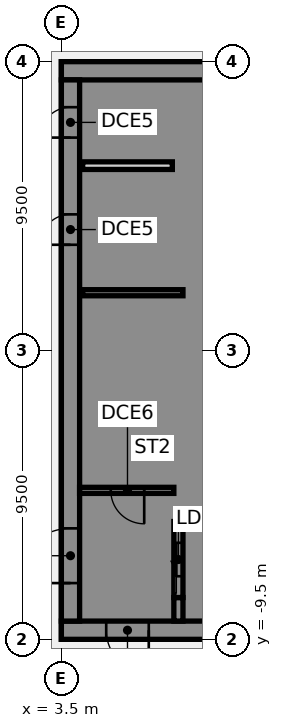
"""IFC4 building model, lengths in metres.
Left out: names, types, materials, properties, quantities, classifications, styles, units other than length and angle.
Written with IfcOpenShell. Run it as: python <this file> out.ifc"""

import sys

from ifc_helpers import new_model, si_unit, direction, frame, frame_2d, origin, place, context, subcontext, project, spatial, polyline, rectangle, outline, extrude, element, fill, save


model = new_model("IFC4")
c1 = context("Model", 3, precision=1e-05, world=origin(), true_north=direction((0.0, 1.0)))
c2 = subcontext(c1, "Body", "Model", "MODEL_VIEW")
j1 = project(units=[si_unit("LENGTHUNIT", "METRE"), si_unit("PLANEANGLEUNIT", "RADIAN")], contexts=[c1])
p1 = place(None, origin())
s1 = spatial("IfcSite", under=j1, at=p1, CompositionType="ELEMENT")
p2 = place(p1, origin())
s2 = spatial("IfcBuilding", under=s1, at=p2, CompositionType="ELEMENT")
p3 = place(p2, frame((0.0, 0.0, 91.0)))
s3 = spatial("IfcBuildingStorey", under=s2, at=p3, CompositionType="ELEMENT", Elevation=91.0)
p4 = place(p3, frame((16.5, -9.2, 0.0), z_axis=(0.0, 0.0, 1.0), x_axis=(-1.0, 0.0, 0.0)))
e1 = element("IfcWall", 1, at=p4, inside=s3, PredefinedType="SHEAR", context=c2, shape_type="SweptSolid", body=[
    extrude(rectangle(XDim=13.0, YDim=0.6, at=frame_2d((6.5, 0.0))), origin(), (0.0, 0.0, 1.0), 3.61),
])
p5 = place(p4, frame((4.15, 0.0, 0.0)))
e2 = element("IfcOpeningElement", 2, at=p5, cuts=e1, PredefinedType="OPENING", context=c2, shape_type="SweptSolid", body=[
    extrude(rectangle(XDim=1.4, YDim=2.1, at=frame_2d((0.7, 1.05))), frame((0.0, 0.31, 0.0), z_axis=(0.0, -1.0, 0.0), x_axis=(1.0, 0.0, 0.0)), (0.0, 0.0, 1.0), 0.62),
])
p6 = place(p4, frame((10.125, 0.0, 0.0)))
e3 = element("IfcOpeningElement", 3, at=p6, cuts=e1, PredefinedType="OPENING", context=c2, shape_type="SweptSolid", body=[
    extrude(rectangle(XDim=1.4, YDim=2.1, at=frame_2d((0.7, 1.05))), frame((0.0, 0.31, 0.0), z_axis=(0.0, -1.0, 0.0), x_axis=(1.0, 0.0, 0.0)), (0.0, 0.0, 1.0), 0.62),
])
p7 = place(p3, frame((16.5, 9.2, 0.0), z_axis=(0.0, 0.0, 1.0), x_axis=(-1.0, 0.0, 0.0)))
e4 = element("IfcWall", 4, at=p7, inside=s3, PredefinedType="SHEAR", context=c2, shape_type="SweptSolid", body=[
    extrude(rectangle(XDim=13.0, YDim=0.6, at=frame_2d((6.5, 0.0))), origin(), (0.0, 0.0, 1.0), 3.61),
])
p8 = place(p3, origin())
e5 = element("IfcWall", 5, at=p8, inside=s3, PredefinedType="SHEAR", context=c2, shape_type="SweptSolid", body=[
    extrude(outline(polyline([(9.8, -5.375), (7.5, -5.375), (7.5, -2.875), (9.8, -2.875), (9.8, -2.625), (7.5, -2.625), (7.5, -0.125), (9.8, -0.125), (9.8, 0.125), (7.5, 0.125), (7.5, 2.625), (9.8, 2.625), (9.8, 2.875), (7.5, 2.875), (7.5, 5.375), (9.8, 5.375), (9.8, 5.625), (7.5, 5.625), (7.5, 8.125), (9.8, 8.125), (9.8, 8.9), (7.5, 8.9), (7.2, 8.9), (7.2, -5.625), (7.5, -5.625), (9.8, -5.625), (9.8, -5.375)])), origin(), (0.0, 0.0, 1.0), 3.61),
])
p9 = place(p3, origin())
e6 = element("IfcWall", 6, at=p9, inside=s3, PredefinedType="SHEAR", context=c2, shape_type="SweptSolid", body=[
    extrude(outline(polyline([(7.5, -8.125), (7.5, -8.9), (9.8, -8.9), (9.8, -8.125), (9.8, -5.625), (9.55, -5.625), (9.55, -8.125), (7.5, -8.125)])), origin(), (0.0, 0.0, 1.0), 3.61),
])
p10 = place(p3, frame((7.35, -8.9, 0.0), z_axis=(0.0, 0.0, 1.0), x_axis=(0.0, 1.0, 0.0)))
e7 = element("IfcWall", 7, at=p10, inside=s3, PredefinedType="SHEAR", context=c2, shape_type="SweptSolid", body=[
    extrude(rectangle(XDim=0.775, YDim=0.3, at=frame_2d((0.387, 0.0))), origin(), (0.0, 0.0, 1.0), 3.61),
])
p11 = place(p3, frame((7.5, 1.9, 0.0), z_axis=(0.0, 0.0, 1.0), x_axis=(-1.0, 0.0, 0.0)))
e8 = element("IfcWall", 8, at=p11, inside=s3, PredefinedType="SHEAR", context=c2, shape_type="SweptSolid", body=[
    extrude(rectangle(XDim=3.3, YDim=0.2, at=frame_2d((1.65, 0.0))), origin(), (0.0, 0.0, 1.0), 3.61),
])
p12 = place(p3, frame((7.35, -8.125, 0.0), z_axis=(0.0, 0.0, 1.0), x_axis=(0.0, 1.0, 0.0)))
e9 = element("IfcWall", 9, at=p12, inside=s3, PredefinedType="SHEAR", context=c2, shape_type="SweptSolid", body=[
    extrude(rectangle(XDim=2.5, YDim=0.3, at=frame_2d((1.25, 0.0))), origin(), (0.0, 0.0, 1.0), 3.61),
])
p13 = place(p12, frame((0.7, 0.0, 0.0)))
e10 = element("IfcOpeningElement", 10, at=p13, cuts=e9, PredefinedType="OPENING", context=c2, shape_type="SweptSolid", body=[
    extrude(rectangle(XDim=1.1, YDim=2.1, at=frame_2d((0.55, 1.05))), frame((0.0, 0.16, 0.0), z_axis=(0.0, -1.0, 0.0), x_axis=(1.0, 0.0, 0.0)), (0.0, 0.0, 1.0), 0.32),
])
p14 = place(p3, frame((3.8, -8.9, 0.0), z_axis=(0.0, 0.0, 1.0), x_axis=(0.0, 1.0, 0.0)))
e11 = element("IfcWall", 11, at=p14, inside=s3, PredefinedType="SHEAR", context=c2, shape_type="SweptSolid", body=[
    extrude(rectangle(XDim=17.8, YDim=0.6, at=frame_2d((8.9, 0.0))), origin(), (0.0, 0.0, 1.0), 3.61),
])
p15 = place(p14, frame((1.25, 0.0, 0.0)))
e12 = element("IfcOpeningElement", 12, at=p15, cuts=e11, PredefinedType="OPENING", context=c2, shape_type="SweptSolid", body=[
    extrude(rectangle(XDim=1.8, YDim=2.1, at=frame_2d((0.9, 1.05))), frame((0.0, 0.31, 0.0), z_axis=(0.0, -1.0, 0.0), x_axis=(1.0, 0.0, 0.0)), (0.0, 0.0, 1.0), 0.62),
])
p16 = place(p14, frame((12.377, 0.0, 0.0)))
e13 = element("IfcOpeningElement", 13, at=p16, cuts=e11, PredefinedType="OPENING", context=c2, shape_type="SweptSolid", body=[
    extrude(rectangle(XDim=1.0, YDim=2.1, at=frame_2d((0.5, 1.05))), frame((0.0, 0.31, 0.0), z_axis=(0.0, -1.0, 0.0), x_axis=(1.0, 0.0, 0.0)), (0.0, 0.0, 1.0), 0.62),
])
p17 = place(p14, frame((15.903, 0.0, 0.0)))
e14 = element("IfcOpeningElement", 14, at=p17, cuts=e11, PredefinedType="OPENING", context=c2, shape_type="SweptSolid", body=[
    extrude(rectangle(XDim=1.0, YDim=2.1, at=frame_2d((0.5, 1.05))), frame((0.0, 0.31, 0.0), z_axis=(0.0, -1.0, 0.0), x_axis=(1.0, 0.0, 0.0)), (0.0, 0.0, 1.0), 0.62),
])
p18 = place(p3, frame((7.15, 6.08, 0.0), z_axis=(0.0, 0.0, 1.0), x_axis=(-1.0, 0.0, 0.0)))
e15 = element("IfcWall", 15, at=p18, inside=s3, PredefinedType="PARTITIONING", context=c2, shape_type="SweptSolid", body=[
    extrude(rectangle(XDim=2.95, YDim=0.25, at=frame_2d((1.475, 0.0))), origin(), (0.0, 0.0, 1.0), 3.61),
])
p19 = place(p3, frame((7.2, -4.6, 0.0), z_axis=(0.0, 0.0, 1.0), x_axis=(-1.0, 0.0, 0.0)))
e16 = element("IfcWall", 16, at=p19, inside=s3, PredefinedType="SHEAR", context=c2, shape_type="SweptSolid", body=[
    extrude(rectangle(XDim=3.1, YDim=0.2, at=frame_2d((1.55, 0.0))), origin(), (0.0, 0.0, 1.0), 3.61),
])
p20 = place(p19, frame((0.975, 0.0, 0.0)))
e17 = element("IfcOpeningElement", 17, at=p20, cuts=e16, PredefinedType="OPENING", context=c2, shape_type="SweptSolid", body=[
    extrude(rectangle(XDim=1.1, YDim=2.1, at=frame_2d((0.55, 1.05))), frame((0.0, 0.11, 0.0), z_axis=(0.0, -1.0, 0.0), x_axis=(1.0, 0.0, 0.0)), (0.0, 0.0, 1.0), 0.22),
])
p21 = place(p6, origin())
e18 = element("IfcDoor", 18, at=p21, inside=s3, OperationType="SINGLE_SWING_LEFT", PredefinedType="DOOR", context=c2, shape_type="SweptSolid", body=[
    extrude(rectangle(XDim=1.4, YDim=2.1, at=frame_2d((0.7, 1.05))), frame((0.0, 0.025, 0.0), z_axis=(0.0, -1.0, 0.0), x_axis=(1.0, 0.0, 0.0)), (0.0, 0.0, 1.0), 0.05),
])
fill(e3, e18)
p22 = place(p15, origin())
e19 = element("IfcDoor", 19, at=p22, inside=s3, OperationType="SINGLE_SWING_LEFT", PredefinedType="DOOR", context=c2, shape_type="SweptSolid", body=[
    extrude(rectangle(XDim=1.8, YDim=2.1, at=frame_2d((0.9, 1.05))), frame((0.0, 0.025, 0.0), z_axis=(0.0, -1.0, 0.0), x_axis=(1.0, 0.0, 0.0)), (0.0, 0.0, 1.0), 0.05),
])
fill(e12, e19)
p23 = place(p16, origin())
e20 = element("IfcDoor", 20, at=p23, inside=s3, OperationType="SINGLE_SWING_LEFT", PredefinedType="DOOR", context=c2, shape_type="SweptSolid", body=[
    extrude(rectangle(XDim=1.0, YDim=2.1, at=frame_2d((0.5, 1.05))), frame((0.0, -0.225, 0.0), z_axis=(0.0, -1.0, 0.0), x_axis=(1.0, 0.0, 0.0)), (0.0, 0.0, 1.0), 0.05),
])
fill(e13, e20)
p24 = place(p17, origin())
e21 = element("IfcDoor", 21, at=p24, inside=s3, OperationType="SINGLE_SWING_LEFT", PredefinedType="DOOR", context=c2, shape_type="SweptSolid", body=[
    extrude(rectangle(XDim=1.0, YDim=2.1, at=frame_2d((0.5, 1.05))), frame((0.0, -0.225, 0.0), z_axis=(0.0, -1.0, 0.0), x_axis=(1.0, 0.0, 0.0)), (0.0, 0.0, 1.0), 0.05),
])
fill(e14, e21)
p25 = place(p20, origin())
e22 = element("IfcDoor", 22, at=p25, inside=s3, OperationType="SINGLE_SWING_LEFT", PredefinedType="DOOR", context=c2, shape_type="SweptSolid", body=[
    extrude(rectangle(XDim=1.1, YDim=2.1, at=frame_2d((0.55, 1.05))), frame((0.0, 0.025, 0.0), z_axis=(0.0, -1.0, 0.0), x_axis=(1.0, 0.0, 0.0)), (0.0, 0.0, 1.0), 0.05),
])
fill(e17, e22)
p26 = place(p13, origin())
e23 = element("IfcDoor", 23, at=p26, inside=s3, OperationType="SLIDING_TO_LEFT", PredefinedType="DOOR", context=c2, shape_type="SweptSolid", body=[
    extrude(rectangle(XDim=1.1, YDim=2.1, at=frame_2d((0.55, 1.05))), frame((0.0, 0.025, 0.0), z_axis=(0.0, -1.0, 0.0), x_axis=(1.0, 0.0, 0.0)), (0.0, 0.0, 1.0), 0.05),
])
fill(e10, e23)
save(model, sys.argv[1])
